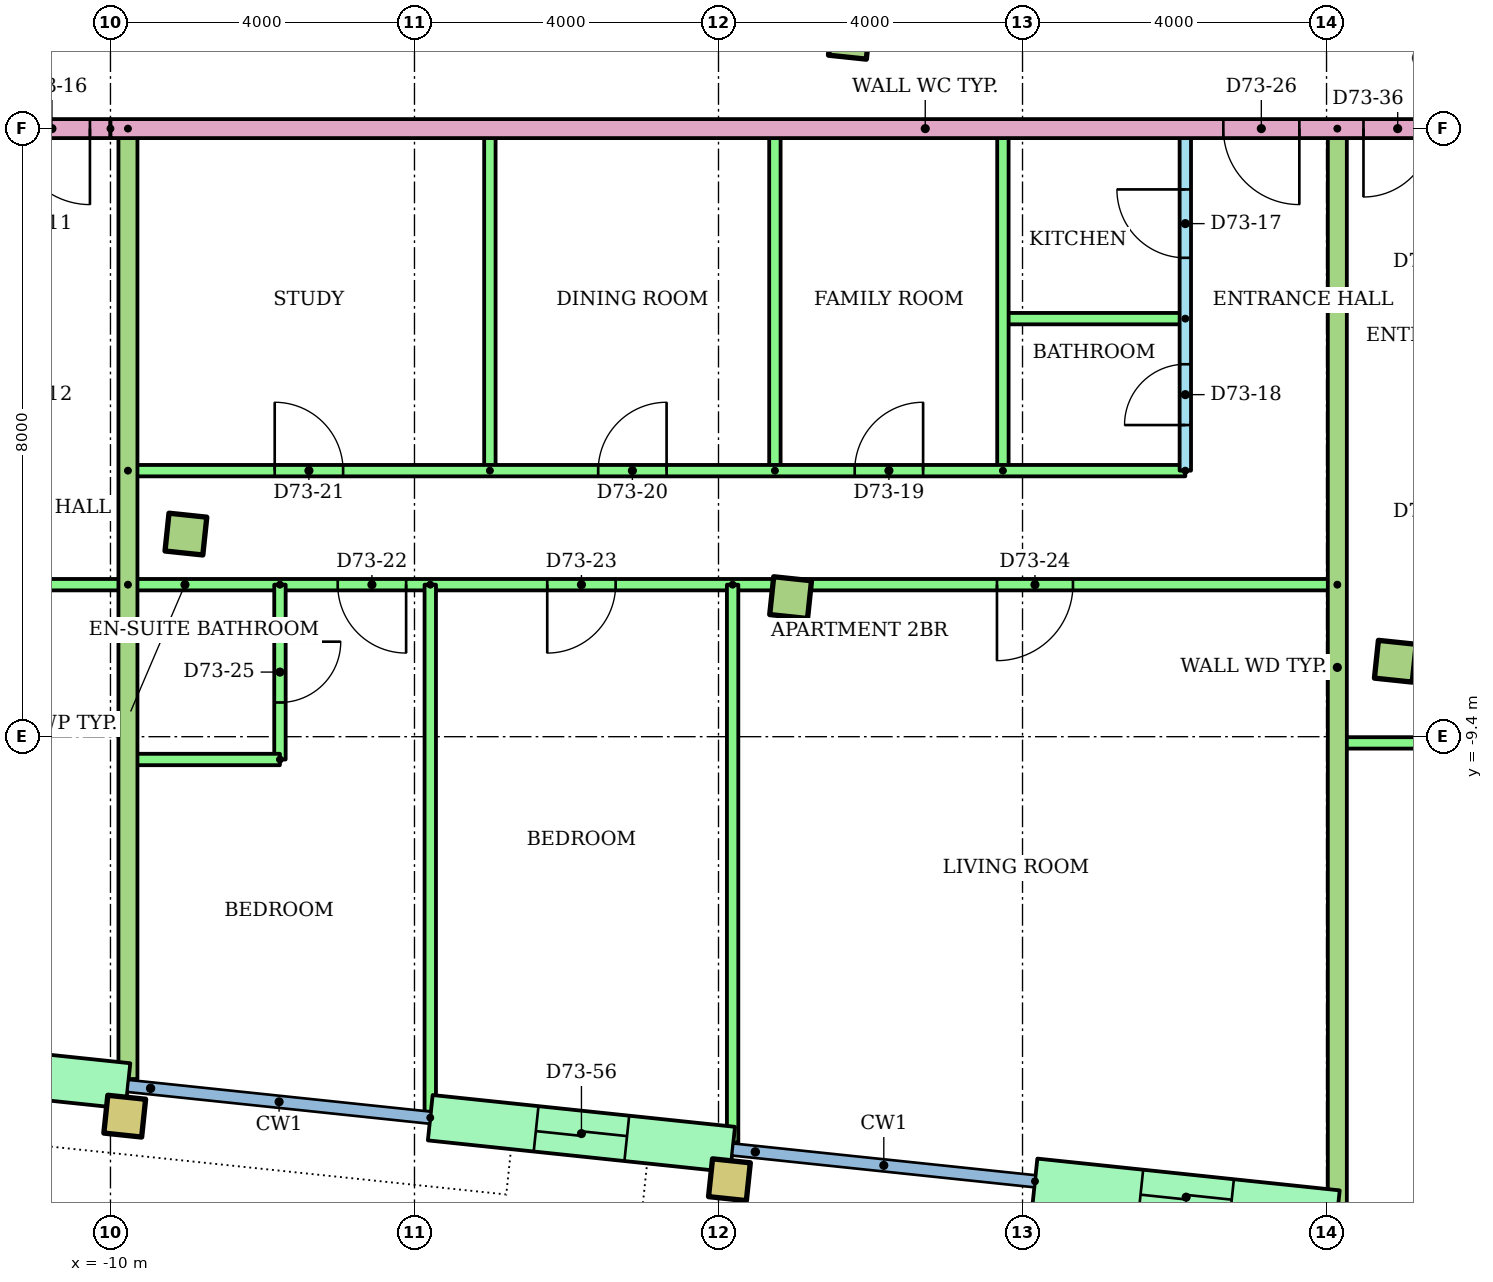
"""IFC4 building model, lengths in metres.
Left out: names, types, materials, properties, quantities, classifications, styles, units other than length and angle.
Written with IfcOpenShell. Run it as: python <this file> out.ifc"""

import sys

from ifc_helpers import new_model, si_unit, direction, frame, frame_2d, origin, origin_2d, place, context, subcontext, project, spatial, rectangle, hollow_rectangle, extrude, element, fill, save


model = new_model("IFC4")
c1 = context("Model", 3, precision=1e-05, world=origin(), true_north=direction((0.0, 1.0)))
c2 = subcontext(c1, "Body", "Model", "MODEL_VIEW")
j1 = project(units=[si_unit("LENGTHUNIT", "METRE"), si_unit("PLANEANGLEUNIT", "RADIAN")], contexts=[c1])
p1 = place(None, origin())
s1 = spatial("IfcSite", under=j1, at=p1, CompositionType="ELEMENT")
p2 = place(p1, origin())
s2 = spatial("IfcBuilding", under=s1, at=p2, CompositionType="ELEMENT")
p3 = place(p2, frame((0.0, 0.0, 278.7)))
s3 = spatial("IfcBuildingStorey", under=s2, at=p3, CompositionType="ELEMENT", Elevation=278.7)
for number, where, z_axis, x_axis in (
    (1, (-9.812, -14.392, 0.0), (0.0, 0.0, 1.0), (0.995, -0.105, 0.0)),
    (2, (-1.856, -15.229, 0.0), (0.0, 0.0, 1.0), (0.995, -0.105, 0.0)),
):
    element("IfcColumn", number, at=place(p3, frame(where, z_axis=z_axis, x_axis=x_axis)), inside=s3, PredefinedType="COLUMN", context=c2, shape_type="SweptSolid", body=[
        extrude(hollow_rectangle(XDim=0.5, YDim=0.5, WallThickness=0.025, at=origin_2d()), origin(), (0.0, 0.0, 1.0), 3.2),
    ])
for number, where, z_axis, x_axis in (
    (3, (-9.007, -6.735, 0.0), (0.0, 0.0, 1.0), (0.995, -0.105, 0.0)),
    (4, (-1.051, -7.571, 0.0), (0.0, 0.0, 1.0), (0.995, -0.105, 0.0)),
    (5, (6.905, -8.407, 0.0), (0.0, 0.0, 1.0), (0.995, -0.105, 0.0)),
    (6, (-0.278, -0.211, 0.0), (0.0, 0.0, 1.0), (0.995, -0.105, 0.0)),
):
    element("IfcColumn", number, at=place(p3, frame(where, z_axis=z_axis, x_axis=x_axis)), inside=s3, PredefinedType="COLUMN", context=c2, shape_type="SweptSolid", body=[
        extrude(rectangle(XDim=0.5, YDim=0.5, at=origin_2d()), origin(), (0.0, 0.0, 1.0), 3.2),
    ])
p4 = place(p3, frame((-13.749, -13.576, 0.0), z_axis=(0.0, 0.0, 1.0), x_axis=(0.994519156568, -0.104554517933, 0.0)))
e7 = element("IfcWall", 7, at=p4, inside=s3, PredefinedType="STANDARD", context=c2, shape_type="SweptSolid", body=[
    extrude(rectangle(XDim=4.0, YDim=0.6, at=frame_2d((2.0, 0.0))), origin(), (0.0, 0.0, 1.0), 2.8),
])
p5 = place(p4, frame((1.4, 0.0, 0.0)))
e8 = element("IfcOpeningElement", 8, at=p5, cuts=e7, PredefinedType="OPENING", context=c2, shape_type="SweptSolid", body=[
    extrude(rectangle(XDim=1.2, YDim=2.1, at=frame_2d((0.6, 1.05))), frame((0.0, 0.31, 0.0), z_axis=(0.0, -1.0, 0.0), x_axis=(1.0, 0.0, 0.0)), (0.0, 0.0, 1.0), 0.62),
])
p6 = place(p3, frame((-5.792, -14.413, 0.0), z_axis=(0.0, 0.0, 1.0), x_axis=(0.99452550138, -0.104494148666, 0.0)))
e9 = element("IfcWall", 9, at=p6, inside=s3, PredefinedType="STANDARD", context=c2, shape_type="SweptSolid", body=[
    extrude(rectangle(XDim=4.0, YDim=0.6, at=frame_2d((2.0, 0.0))), origin(), (0.0, 0.0, 1.0), 2.8),
])
p7 = place(p6, frame((1.4, 0.0, 0.0)))
e10 = element("IfcOpeningElement", 10, at=p7, cuts=e9, PredefinedType="OPENING", context=c2, shape_type="SweptSolid", body=[
    extrude(rectangle(XDim=1.2, YDim=2.1, at=frame_2d((0.6, 1.05))), frame((0.0, 0.31, 0.0), z_axis=(0.0, -1.0, 0.0), x_axis=(1.0, 0.0, 0.0)), (0.0, 0.0, 1.0), 0.62),
])
p8 = place(p3, frame((2.164, -15.249, 0.0), z_axis=(0.0, 0.0, 1.0), x_axis=(0.99452550138, -0.104494148666, 0.0)))
e11 = element("IfcWall", 11, at=p8, inside=s3, PredefinedType="STANDARD", context=c2, shape_type="SweptSolid", body=[
    extrude(rectangle(XDim=4.0, YDim=0.6, at=frame_2d((2.0, 0.0))), origin(), (0.0, 0.0, 1.0), 2.8),
])
p9 = place(p8, frame((1.4, 0.0, 0.0)))
e12 = element("IfcOpeningElement", 12, at=p9, cuts=e11, PredefinedType="OPENING", context=c2, shape_type="SweptSolid", body=[
    extrude(rectangle(XDim=1.2, YDim=2.1, at=frame_2d((0.6, 1.05))), frame((0.0, 0.31, 0.0), z_axis=(0.0, -1.0, 0.0), x_axis=(1.0, 0.0, 0.0)), (0.0, 0.0, 1.0), 0.62),
])
p10 = place(p3, frame((-9.77, -7.4, 0.0), z_axis=(0.0, 0.0, 1.0), x_axis=(-1.0, 0.0, 0.0)))
e13 = element("IfcWall", 13, at=p10, inside=s3, PredefinedType="PARTITIONING", context=c2, shape_type="SweptSolid", body=[
    extrude(rectangle(XDim=14.411, YDim=0.15, at=frame_2d((7.206, 0.0))), origin(), (0.0, 0.0, 1.0), 2.4),
])
p11 = place(p10, frame((5.789, 0.0, 0.0)))
e14 = element("IfcOpeningElement", 14, at=p11, cuts=e13, PredefinedType="OPENING", context=c2, shape_type="SweptSolid", body=[
    extrude(rectangle(XDim=1.0, YDim=2.1, at=frame_2d((0.5, 1.05))), frame((0.0, 0.085, 0.0), z_axis=(0.0, -1.0, 0.0), x_axis=(1.0, 0.0, 0.0)), (0.0, 0.0, 1.0), 0.17),
])
p12 = place(p3, frame((4.142, -5.9, 0.0), z_axis=(0.0, 0.0, 1.0), x_axis=(0.0, 1.0, 0.0)))
e15 = element("IfcWall", 15, at=p12, inside=s3, PredefinedType="PARTITIONING", context=c2, shape_type="SweptSolid", body=[
    extrude(rectangle(XDim=4.5, YDim=0.15, at=frame_2d((2.25, 0.0))), origin(), (0.0, 0.0, 1.0), 2.4),
])
p13 = place(p12, frame((2.8, 0.0, 0.0)))
e16 = element("IfcOpeningElement", 16, at=p13, cuts=e15, PredefinedType="OPENING", context=c2, shape_type="SweptSolid", body=[
    extrude(rectangle(XDim=0.9, YDim=2.1, at=frame_2d((0.45, 1.05))), frame((0.0, 0.085, 0.0), z_axis=(0.0, -1.0, 0.0), x_axis=(1.0, 0.0, 0.0)), (0.0, 0.0, 1.0), 0.17),
])
p14 = place(p12, frame((0.6, 0.0, 0.0)))
e17 = element("IfcOpeningElement", 17, at=p14, cuts=e15, PredefinedType="OPENING", context=c2, shape_type="SweptSolid", body=[
    extrude(rectangle(XDim=0.8, YDim=2.1, at=frame_2d((0.4, 1.05))), frame((0.0, 0.085, 0.0), z_axis=(0.0, -1.0, 0.0), x_axis=(1.0, 0.0, 0.0)), (0.0, 0.0, 1.0), 0.17),
])
p15 = place(p3, frame((4.142, -3.9, 0.0), z_axis=(0.0, 0.0, 1.0), x_axis=(-1.0, 0.0, 0.0)))
e18 = element("IfcWall", 18, at=p15, inside=s3, PredefinedType="PARTITIONING", context=c2, shape_type="SweptSolid", body=[
    extrude(rectangle(XDim=2.4, YDim=0.15, at=frame_2d((1.2, 0.0))), origin(), (0.0, 0.0, 1.0), 2.4),
])
for number, where, z_axis, x_axis in (
    (19, (1.742, -5.9, 0.0), (0.0, 0.0, 1.0), (0.0, 1.0, 0.0)),
    (20, (-1.258, -5.9, 0.0), (0.0, 0.0, 1.0), (0.0, 1.0, 0.0)),
    (21, (-5.008, -5.9, 0.0), (0.0, 0.0, 1.0), (0.0, 1.0, 0.0)),
):
    element("IfcWall", number, at=place(p3, frame(where, z_axis=z_axis, x_axis=x_axis)), inside=s3, PredefinedType="PARTITIONING", context=c2, shape_type="SweptSolid", body=[
        extrude(rectangle(XDim=4.5, YDim=0.15, at=frame_2d((2.25, 0.0))), origin(), (0.0, 0.0, 1.0), 2.4),
    ])
p16 = place(p3, frame((-9.77, -5.9, 0.0)))
e22 = element("IfcWall", 22, at=p16, inside=s3, PredefinedType="PARTITIONING", context=c2, shape_type="SweptSolid", body=[
    extrude(rectangle(XDim=13.912, YDim=0.15, at=frame_2d((6.956, 0.0))), origin(), (0.0, 0.0, 1.0), 2.4),
])
p17 = place(p16, frame((9.562, 0.0, 0.0)))
e23 = element("IfcOpeningElement", 23, at=p17, cuts=e22, PredefinedType="OPENING", context=c2, shape_type="SweptSolid", body=[
    extrude(rectangle(XDim=0.9, YDim=2.1, at=frame_2d((0.45, 1.05))), frame((0.0, 0.085, 0.0), z_axis=(0.0, -1.0, 0.0), x_axis=(1.0, 0.0, 0.0)), (0.0, 0.0, 1.0), 0.17),
])
p18 = place(p16, frame((6.187, 0.0, 0.0)))
e24 = element("IfcOpeningElement", 24, at=p18, cuts=e22, PredefinedType="OPENING", context=c2, shape_type="SweptSolid", body=[
    extrude(rectangle(XDim=0.9, YDim=2.1, at=frame_2d((0.45, 1.05))), frame((0.0, 0.085, 0.0), z_axis=(0.0, -1.0, 0.0), x_axis=(1.0, 0.0, 0.0)), (0.0, 0.0, 1.0), 0.17),
])
p19 = place(p16, frame((1.931, 0.0, 0.0)))
e25 = element("IfcOpeningElement", 25, at=p19, cuts=e22, PredefinedType="OPENING", context=c2, shape_type="SweptSolid", body=[
    extrude(rectangle(XDim=0.9, YDim=2.1, at=frame_2d((0.45, 1.05))), frame((0.0, 0.085, 0.0), z_axis=(0.0, -1.0, 0.0), x_axis=(1.0, 0.0, 0.0)), (0.0, 0.0, 1.0), 0.17),
])
p20 = place(p3, frame((6.142, -7.4, 0.0), z_axis=(0.0, 0.0, 1.0), x_axis=(-1.0, 0.0, 0.0)))
e26 = element("IfcWall", 26, at=p20, inside=s3, PredefinedType="PARTITIONING", context=c2, shape_type="SweptSolid", body=[
    extrude(rectangle(XDim=15.912, YDim=0.15, at=frame_2d((7.956, 0.0))), origin(), (0.0, 0.0, 1.0), 2.4),
])
p21 = place(p20, frame((12.252, 0.0, 0.0)))
e27 = element("IfcOpeningElement", 27, at=p21, cuts=e26, PredefinedType="OPENING", context=c2, shape_type="SweptSolid", body=[
    extrude(rectangle(XDim=0.9, YDim=2.1, at=frame_2d((0.45, 1.05))), frame((0.0, 0.085, 0.0), z_axis=(0.0, -1.0, 0.0), x_axis=(1.0, 0.0, 0.0)), (0.0, 0.0, 1.0), 0.17),
])
p22 = place(p20, frame((9.495, 0.0, 0.0)))
e28 = element("IfcOpeningElement", 28, at=p22, cuts=e26, PredefinedType="OPENING", context=c2, shape_type="SweptSolid", body=[
    extrude(rectangle(XDim=0.9, YDim=2.1, at=frame_2d((0.45, 1.05))), frame((0.0, 0.085, 0.0), z_axis=(0.0, -1.0, 0.0), x_axis=(1.0, 0.0, 0.0)), (0.0, 0.0, 1.0), 0.17),
])
p23 = place(p20, frame((3.478, 0.0, 0.0)))
e29 = element("IfcOpeningElement", 29, at=p23, cuts=e26, PredefinedType="OPENING", context=c2, shape_type="SweptSolid", body=[
    extrude(rectangle(XDim=1.0, YDim=2.1, at=frame_2d((0.5, 1.05))), frame((0.0, 0.085, 0.0), z_axis=(0.0, -1.0, 0.0), x_axis=(1.0, 0.0, 0.0)), (0.0, 0.0, 1.0), 0.17),
])
p24 = place(p3, frame((-5.792, -7.4, 0.0), z_axis=(0.0, 0.0, 1.0), x_axis=(0.0, -1.0, 0.0)))
e30 = element("IfcWall", 30, at=p24, inside=s3, PredefinedType="PARTITIONING", context=c2, shape_type="SweptSolid", body=[
    extrude(rectangle(XDim=6.933, YDim=0.15, at=frame_2d((3.467, 0.0))), origin(), (0.0, 0.0, 1.0), 2.4),
])
p25 = place(p3, frame((-1.814, -7.4, 0.0), z_axis=(0.0, 0.0, 1.0), x_axis=(0.0, -1.0, 0.0)))
e31 = element("IfcWall", 31, at=p25, inside=s3, PredefinedType="PARTITIONING", context=c2, shape_type="SweptSolid", body=[
    extrude(rectangle(XDim=7.341, YDim=0.15, at=frame_2d((3.67, 0.0))), origin(), (0.0, 0.0, 1.0), 2.4),
])
p26 = place(p3, frame((-7.77, -7.4, 0.0), z_axis=(0.0, 0.0, 1.0), x_axis=(0.0, -1.0, 0.0)))
e32 = element("IfcWall", 32, at=p26, inside=s3, PredefinedType="PARTITIONING", context=c2, shape_type="SweptSolid", body=[
    extrude(rectangle(XDim=2.3, YDim=0.15, at=frame_2d((1.15, 0.0))), origin(), (0.0, 0.0, 1.0), 2.4),
])
p27 = place(p26, frame((0.75, 0.0, 0.0)))
e33 = element("IfcOpeningElement", 33, at=p27, cuts=e32, PredefinedType="OPENING", context=c2, shape_type="SweptSolid", body=[
    extrude(rectangle(XDim=0.8, YDim=2.1, at=frame_2d((0.4, 1.05))), frame((0.0, 0.085, 0.0), z_axis=(0.0, -1.0, 0.0), x_axis=(1.0, 0.0, 0.0)), (0.0, 0.0, 1.0), 0.17),
])
p28 = place(p3, frame((-7.77, -9.7, 0.0), z_axis=(0.0, 0.0, 1.0), x_axis=(-1.0, 0.0, 0.0)))
e34 = element("IfcWall", 34, at=p28, inside=s3, PredefinedType="PARTITIONING", context=c2, shape_type="SweptSolid", body=[
    extrude(rectangle(XDim=2.0, YDim=0.15, at=frame_2d((1.0, 0.0))), origin(), (0.0, 0.0, 1.0), 2.4),
])
p29 = place(p3, frame((-9.77, -1.4, 0.0), z_axis=(0.0, 0.0, 1.0), x_axis=(0.0, -1.0, 0.0)))
e35 = element("IfcWall", 35, at=p29, inside=s3, PredefinedType="PARTITIONING", context=c2, shape_type="SweptSolid", body=[
    extrude(rectangle(XDim=12.504, YDim=0.25, at=frame_2d((6.252, 0.0))), origin(), (0.0, 0.0, 1.0), 2.4),
])
p30 = place(p3, frame((29.94, -9.482, 0.0), z_axis=(0.0, 0.0, 1.0), x_axis=(-1.0, 0.0, 0.0)))
e36 = element("IfcWall", 36, at=p30, inside=s3, PredefinedType="PARTITIONING", context=c2, shape_type="SweptSolid", body=[
    extrude(rectangle(XDim=23.798, YDim=0.15, at=frame_2d((11.899, 0.0))), origin(), (0.0, 0.0, 1.0), 2.4),
])
p31 = place(p30, frame((19.32, 0.0, 0.0)))
e37 = element("IfcOpeningElement", 37, at=p31, cuts=e36, PredefinedType="OPENING", context=c2, shape_type="SweptSolid", body=[
    extrude(rectangle(XDim=1.0, YDim=2.1, at=frame_2d((0.5, 1.05))), frame((0.0, 0.085, 0.0), z_axis=(0.0, -1.0, 0.0), x_axis=(1.0, 0.0, 0.0)), (0.0, 0.0, 1.0), 0.17),
])
p32 = place(p30, frame((13.403, 0.0, 0.0)))
e38 = element("IfcOpeningElement", 38, at=p32, cuts=e36, PredefinedType="OPENING", context=c2, shape_type="SweptSolid", body=[
    extrude(rectangle(XDim=0.9, YDim=2.1, at=frame_2d((0.45, 1.05))), frame((0.0, 0.085, 0.0), z_axis=(0.0, -1.0, 0.0), x_axis=(1.0, 0.0, 0.0)), (0.0, 0.0, 1.0), 0.17),
])
p33 = place(p30, frame((9.425, 0.0, 0.0)))
e39 = element("IfcOpeningElement", 39, at=p33, cuts=e36, PredefinedType="OPENING", context=c2, shape_type="SweptSolid", body=[
    extrude(rectangle(XDim=0.9, YDim=2.1, at=frame_2d((0.45, 1.05))), frame((0.0, 0.085, 0.0), z_axis=(0.0, -1.0, 0.0), x_axis=(1.0, 0.0, 0.0)), (0.0, 0.0, 1.0), 0.17),
])
p34 = place(p30, frame((2.434, 0.0, 0.0)))
e40 = element("IfcOpeningElement", 40, at=p34, cuts=e36, PredefinedType="OPENING", context=c2, shape_type="SweptSolid", body=[
    extrude(rectangle(XDim=0.9, YDim=2.1, at=frame_2d((0.45, 1.05))), frame((0.0, 0.085, 0.0), z_axis=(0.0, -1.0, 0.0), x_axis=(1.0, 0.0, 0.0)), (0.0, 0.0, 1.0), 0.17),
])
p35 = place(p3, frame((6.142, -1.4, 0.0), z_axis=(0.0, 0.0, 1.0), x_axis=(0.0, -1.0, 0.0)))
e41 = element("IfcWall", 41, at=p35, inside=s3, PredefinedType="PARTITIONING", context=c2, shape_type="SweptSolid", body=[
    extrude(rectangle(XDim=14.177, YDim=0.25, at=frame_2d((7.088, 0.0))), origin(), (0.0, 0.0, 1.0), 2.4),
])
p36 = place(p3, frame((-10.0, -1.4, 0.0), z_axis=(0.0, 0.0, 1.0), x_axis=(-1.0, 0.0, 0.0)))
e42 = element("IfcWall", 42, at=p36, inside=s3, PredefinedType="PARTITIONING", context=c2, shape_type="SweptSolid", body=[
    extrude(rectangle(XDim=13.56, YDim=0.25, at=frame_2d((6.78, 0.0))), origin(), (0.0, 0.0, 1.0), 2.4),
])
p37 = place(p36, frame((0.27, 0.0, 0.0)))
e43 = element("IfcOpeningElement", 43, at=p37, cuts=e42, PredefinedType="OPENING", context=c2, shape_type="SweptSolid", body=[
    extrude(rectangle(XDim=1.0, YDim=2.1, at=frame_2d((0.5, 1.05))), frame((0.0, 0.135, 0.0), z_axis=(0.0, -1.0, 0.0), x_axis=(1.0, 0.0, 0.0)), (0.0, 0.0, 1.0), 0.27),
])
p38 = place(p3, frame((10.0, -1.4, 0.0), z_axis=(0.0, 0.0, 1.0), x_axis=(-1.0, 0.0, 0.0)))
e44 = element("IfcWall", 44, at=p38, inside=s3, PredefinedType="PARTITIONING", context=c2, shape_type="SweptSolid", body=[
    extrude(rectangle(XDim=20.0, YDim=0.25, at=frame_2d((10.0, 0.0))), origin(), (0.0, 0.0, 1.0), 2.4),
])
p39 = place(p38, frame((4.358, 0.0, 0.0)))
e45 = element("IfcOpeningElement", 45, at=p39, cuts=e44, PredefinedType="OPENING", context=c2, shape_type="SweptSolid", body=[
    extrude(rectangle(XDim=1.0, YDim=2.1, at=frame_2d((0.5, 1.05))), frame((0.0, 0.135, 0.0), z_axis=(0.0, -1.0, 0.0), x_axis=(1.0, 0.0, 0.0)), (0.0, 0.0, 1.0), 0.27),
])
p40 = place(p38, frame((2.614, 0.0, 0.0)))
e46 = element("IfcOpeningElement", 46, at=p40, cuts=e44, PredefinedType="OPENING", context=c2, shape_type="SweptSolid", body=[
    extrude(rectangle(XDim=0.9, YDim=2.1, at=frame_2d((0.45, 1.05))), frame((0.0, 0.135, 0.0), z_axis=(0.0, -1.0, 0.0), x_axis=(1.0, 0.0, 0.0)), (0.0, 0.0, 1.0), 0.27),
])
p41 = place(p37, origin())
e47 = element("IfcDoor", 47, at=p41, inside=s3, OperationType="SINGLE_SWING_LEFT", PredefinedType="DOOR", context=c2, shape_type="SweptSolid", body=[
    extrude(rectangle(XDim=1.0, YDim=2.1, at=frame_2d((0.5, 1.05))), frame((0.0, 0.025, 0.0), z_axis=(0.0, -1.0, 0.0), x_axis=(1.0, 0.0, 0.0)), (0.0, 0.0, 1.0), 0.05),
])
fill(e43, e47)
p42 = place(p13, origin())
e48 = element("IfcDoor", 48, at=p42, inside=s3, OperationType="SINGLE_SWING_RIGHT", PredefinedType="DOOR", context=c2, shape_type="SweptSolid", body=[
    extrude(rectangle(XDim=0.9, YDim=2.1, at=frame_2d((0.45, 1.05))), frame((0.0, 0.025, 0.0), z_axis=(0.0, -1.0, 0.0), x_axis=(1.0, 0.0, 0.0)), (0.0, 0.0, 1.0), 0.05),
])
fill(e16, e48)
p43 = place(p14, origin())
e49 = element("IfcDoor", 49, at=p43, inside=s3, OperationType="SINGLE_SWING_LEFT", PredefinedType="DOOR", context=c2, shape_type="SweptSolid", body=[
    extrude(rectangle(XDim=0.8, YDim=2.1, at=frame_2d((0.4, 1.05))), frame((0.0, 0.025, 0.0), z_axis=(0.0, -1.0, 0.0), x_axis=(1.0, 0.0, 0.0)), (0.0, 0.0, 1.0), 0.05),
])
fill(e17, e49)
p44 = place(p17, origin())
e50 = element("IfcDoor", 50, at=p44, inside=s3, OperationType="SINGLE_SWING_RIGHT", PredefinedType="DOOR", context=c2, shape_type="SweptSolid", body=[
    extrude(rectangle(XDim=0.9, YDim=2.1, at=frame_2d((0.45, 1.05))), frame((0.0, 0.025, 0.0), z_axis=(0.0, -1.0, 0.0), x_axis=(1.0, 0.0, 0.0)), (0.0, 0.0, 1.0), 0.05),
])
fill(e23, e50)
p45 = place(p18, origin())
e51 = element("IfcDoor", 51, at=p45, inside=s3, OperationType="SINGLE_SWING_RIGHT", PredefinedType="DOOR", context=c2, shape_type="SweptSolid", body=[
    extrude(rectangle(XDim=0.9, YDim=2.1, at=frame_2d((0.45, 1.05))), frame((0.0, 0.025, 0.0), z_axis=(0.0, -1.0, 0.0), x_axis=(1.0, 0.0, 0.0)), (0.0, 0.0, 1.0), 0.05),
])
fill(e24, e51)
p46 = place(p19, origin())
e52 = element("IfcDoor", 52, at=p46, inside=s3, OperationType="SINGLE_SWING_LEFT", PredefinedType="DOOR", context=c2, shape_type="SweptSolid", body=[
    extrude(rectangle(XDim=0.9, YDim=2.1, at=frame_2d((0.45, 1.05))), frame((0.0, 0.025, 0.0), z_axis=(0.0, -1.0, 0.0), x_axis=(1.0, 0.0, 0.0)), (0.0, 0.0, 1.0), 0.05),
])
fill(e25, e52)
p47 = place(p21, origin())
e53 = element("IfcDoor", 53, at=p47, inside=s3, OperationType="SINGLE_SWING_LEFT", PredefinedType="DOOR", context=c2, shape_type="SweptSolid", body=[
    extrude(rectangle(XDim=0.9, YDim=2.1, at=frame_2d((0.45, 1.05))), frame((0.0, 0.025, 0.0), z_axis=(0.0, -1.0, 0.0), x_axis=(1.0, 0.0, 0.0)), (0.0, 0.0, 1.0), 0.05),
])
fill(e27, e53)
p48 = place(p22, origin())
e54 = element("IfcDoor", 54, at=p48, inside=s3, OperationType="SINGLE_SWING_RIGHT", PredefinedType="DOOR", context=c2, shape_type="SweptSolid", body=[
    extrude(rectangle(XDim=0.9, YDim=2.1, at=frame_2d((0.45, 1.05))), frame((0.0, 0.025, 0.0), z_axis=(0.0, -1.0, 0.0), x_axis=(1.0, 0.0, 0.0)), (0.0, 0.0, 1.0), 0.05),
])
fill(e28, e54)
p49 = place(p23, origin())
e55 = element("IfcDoor", 55, at=p49, inside=s3, OperationType="SINGLE_SWING_RIGHT", PredefinedType="DOOR", context=c2, shape_type="SweptSolid", body=[
    extrude(rectangle(XDim=1.0, YDim=2.1, at=frame_2d((0.5, 1.05))), frame((0.0, 0.025, 0.0), z_axis=(0.0, -1.0, 0.0), x_axis=(1.0, 0.0, 0.0)), (0.0, 0.0, 1.0), 0.05),
])
fill(e29, e55)
p50 = place(p27, origin())
e56 = element("IfcDoor", 56, at=p50, inside=s3, OperationType="SINGLE_SWING_LEFT", PredefinedType="DOOR", context=c2, shape_type="SweptSolid", body=[
    extrude(rectangle(XDim=0.8, YDim=2.1, at=frame_2d((0.4, 1.05))), frame((0.0, 0.025, 0.0), z_axis=(0.0, -1.0, 0.0), x_axis=(1.0, 0.0, 0.0)), (0.0, 0.0, 1.0), 0.05),
])
fill(e33, e56)
p51 = place(p39, origin())
e57 = element("IfcDoor", 57, at=p51, inside=s3, OperationType="SINGLE_SWING_LEFT", PredefinedType="DOOR", context=c2, shape_type="SweptSolid", body=[
    extrude(rectangle(XDim=1.0, YDim=2.1, at=frame_2d((0.5, 1.05))), frame((0.0, 0.025, 0.0), z_axis=(0.0, -1.0, 0.0), x_axis=(1.0, 0.0, 0.0)), (0.0, 0.0, 1.0), 0.05),
])
fill(e45, e57)
p52 = place(p40, origin())
e58 = element("IfcDoor", 58, at=p52, inside=s3, OperationType="SINGLE_SWING_RIGHT", PredefinedType="DOOR", context=c2, shape_type="SweptSolid", body=[
    extrude(rectangle(XDim=0.9, YDim=2.1, at=frame_2d((0.45, 1.05))), frame((0.0, 0.025, 0.0), z_axis=(0.0, -1.0, 0.0), x_axis=(1.0, 0.0, 0.0)), (0.0, 0.0, 1.0), 0.05),
])
fill(e46, e58)
p53 = place(p7, origin())
e59 = element("IfcDoor", 59, at=p53, inside=s3, OperationType="SLIDING_TO_LEFT", PredefinedType="DOOR", context=c2, shape_type="SweptSolid", body=[
    extrude(rectangle(XDim=1.2, YDim=2.1, at=frame_2d((0.6, 1.05))), frame((0.0, 0.025, 0.0), z_axis=(0.0, -1.0, 0.0), x_axis=(1.0, 0.0, 0.0)), (0.0, 0.0, 1.0), 0.05),
])
fill(e10, e59)
p54 = place(p9, origin())
e60 = element("IfcDoor", 60, at=p54, inside=s3, OperationType="SLIDING_TO_LEFT", PredefinedType="DOOR", context=c2, shape_type="SweptSolid", body=[
    extrude(rectangle(XDim=1.2, YDim=2.1, at=frame_2d((0.6, 1.05))), frame((0.0, 0.025, 0.0), z_axis=(0.0, -1.0, 0.0), x_axis=(1.0, 0.0, 0.0)), (0.0, 0.0, 1.0), 0.05),
])
fill(e12, e60)
save(model, sys.argv[1])
